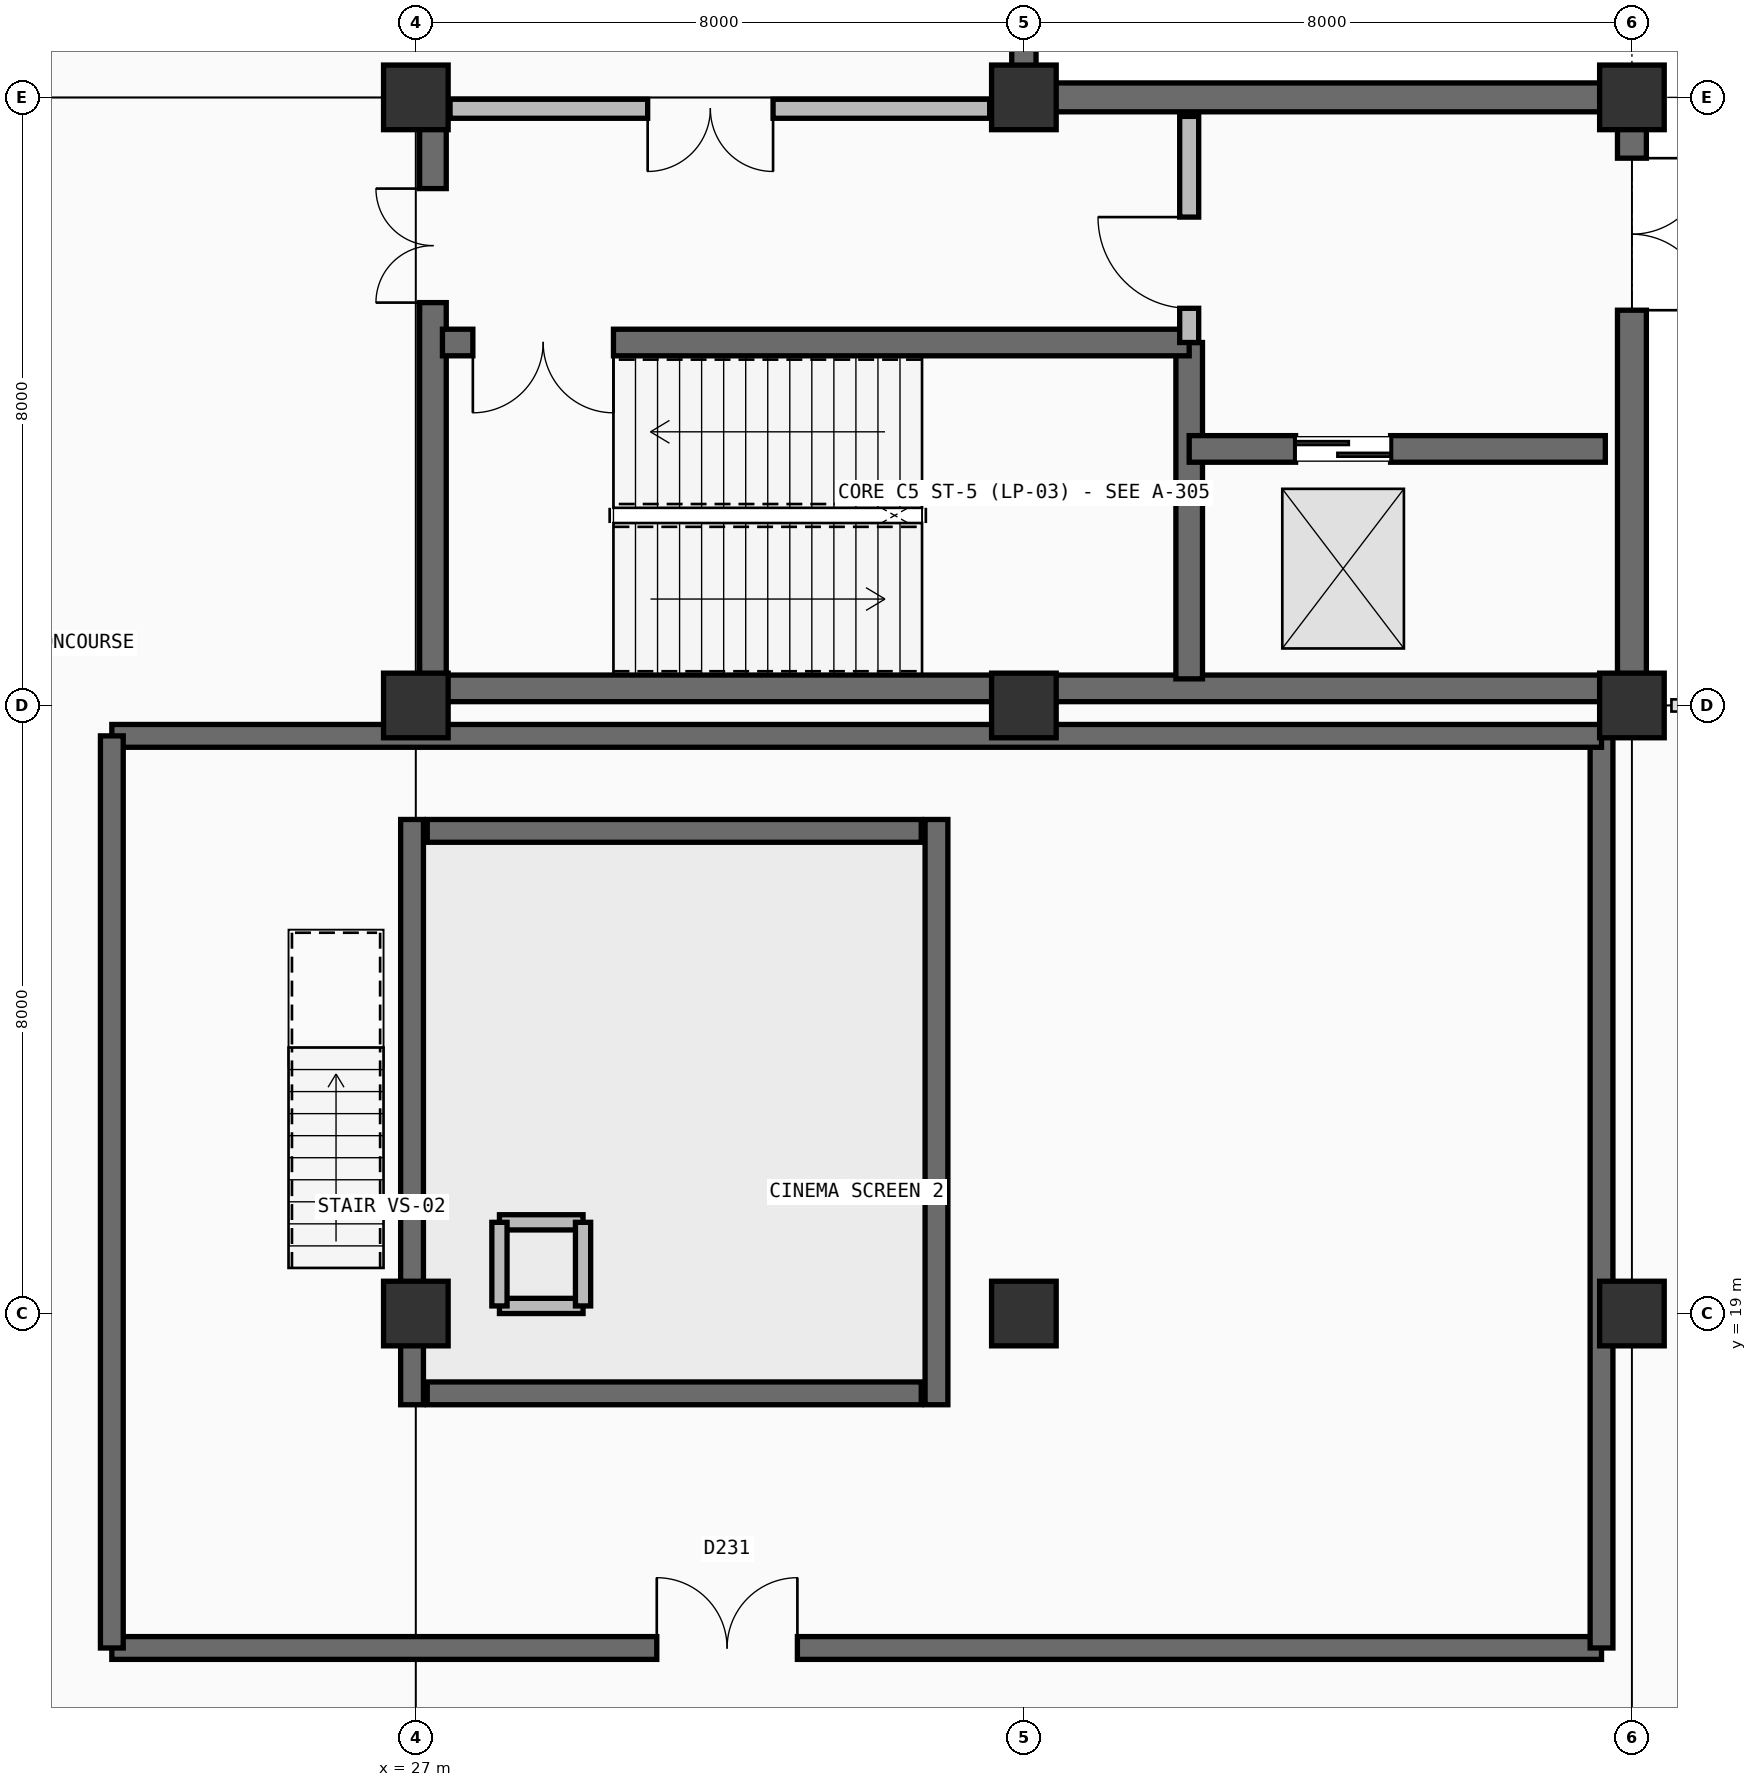
"""IFC4 building model, lengths in metres.
Left out: names, types, materials, properties, quantities, classifications, styles, units other than length and angle.
Written with IfcOpenShell. Run it as: python <this file> out.ifc"""

import sys

from ifc_helpers import new_model, si_unit, direction, frame, frame_2d, origin, origin_2d, place, context, subcontext, project, spatial, polyline, rectangle, outline, extrude, element, fill, save


model = new_model("IFC4")
c1 = context("Model", 3, precision=1e-05, world=origin(), true_north=direction((0.0, 1.0)))
c2 = subcontext(c1, "Body", "Model", "MODEL_VIEW")
j1 = project(units=[si_unit("LENGTHUNIT", "METRE"), si_unit("PLANEANGLEUNIT", "RADIAN")], contexts=[c1])
p1 = place(None, origin())
s1 = spatial("IfcSite", under=j1, at=p1, CompositionType="ELEMENT")
p2 = place(p1, origin())
s2 = spatial("IfcBuilding", under=s1, at=p2, CompositionType="ELEMENT")
p3 = place(p2, origin())
s3 = spatial("IfcBuildingStorey", under=s2, at=p3, CompositionType="ELEMENT", Elevation=0.0)
for number, where, z_axis, x_axis in (
    (1, (27.0, 19.0, 0.0), (0.0, 0.0, 1.0), (1.0, 0.0, 0.0)),
    (2, (27.0, 27.0, 0.0), (0.0, 0.0, 1.0), (1.0, 0.0, 0.0)),
    (3, (27.0, 35.0, 0.0), (0.0, 0.0, 1.0), (1.0, 0.0, 0.0)),
    (4, (35.0, 19.0, 0.0), (0.0, 0.0, 1.0), (1.0, 0.0, 0.0)),
    (5, (35.0, 27.0, 0.0), (0.0, 0.0, 1.0), (1.0, 0.0, 0.0)),
    (6, (35.0, 35.0, 0.0), (0.0, 0.0, 1.0), (1.0, 0.0, 0.0)),
    (7, (43.0, 19.0, 0.0), (0.0, 0.0, 1.0), (1.0, 0.0, 0.0)),
    (8, (43.0, 27.0, 0.0), (0.0, 0.0, 1.0), (1.0, 0.0, 0.0)),
    (9, (43.0, 35.0, 0.0), (0.0, 0.0, 1.0), (1.0, 0.0, 0.0)),
):
    element("IfcColumn", number, at=place(p3, frame(where, z_axis=z_axis, x_axis=x_axis)), inside=s3, PredefinedType="COLUMN", context=c2, shape_type="SweptSolid", body=[
        extrude(rectangle(XDim=0.85, YDim=0.85, at=origin_2d()), origin(), (0.0, 0.0, 1.0), 5.4),
    ])
for number, where, z_axis, x_axis in (
    (10, (26.95, 17.8, 0.0), (0.0, 0.0, 1.0), (0.0, 1.0, 0.0)),
    (11, (33.85, 17.8, 0.0), (0.0, 0.0, 1.0), (0.0, 1.0, 0.0)),
):
    element("IfcWall", number, at=place(p3, frame(where, z_axis=z_axis, x_axis=x_axis)), inside=s3, PredefinedType="SHEAR", context=c2, shape_type="SweptSolid", body=[
        extrude(outline(polyline([(0.0, 0.0), (7.7, 0.0), (7.7, 2.07), (0.0, 0.32), (0.0, 0.0)])), frame((0.0, 0.15, 0.0), z_axis=(0.0, -1.0, 0.0), x_axis=(1.0, 0.0, 0.0)), (0.0, 0.0, 1.0), 0.3),
    ])
p4 = place(p3, frame((27.15, 25.35, 0.0), z_axis=(0.0, 0.0, 1.0), x_axis=(1.0, 0.0, 0.0)))
e12 = element("IfcWall", 12, at=p4, inside=s3, PredefinedType="SHEAR", context=c2, shape_type="SweptSolid", body=[
    extrude(rectangle(XDim=6.5, YDim=0.3, at=frame_2d((3.25, 0.0))), origin(), (0.0, 0.0, 1.0), 2.07),
])
p5 = place(p3, frame((27.15, 17.95, 0.0), z_axis=(0.0, 0.0, 1.0), x_axis=(1.0, 0.0, 0.0)))
e13 = element("IfcWall", 13, at=p5, inside=s3, PredefinedType="SHEAR", context=c2, shape_type="SweptSolid", body=[
    extrude(rectangle(XDim=6.5, YDim=0.3, at=frame_2d((3.25, 0.0))), origin(), (0.0, 0.0, 1.0), 0.32),
])
p6 = place(p3, frame((35.0, 43.0, 0.0), z_axis=(0.0, 0.0, 1.0), x_axis=(0.0, -1.0, 0.0)))
e14 = element("IfcWall", 14, at=p6, inside=s3, PredefinedType="SOLIDWALL", context=c2, shape_type="SweptSolid", body=[
    extrude(rectangle(XDim=8.0, YDim=0.32, at=frame_2d((4.0, 0.0))), origin(), (0.0, 0.0, 1.0), 5.4),
])
p7 = place(p6, frame((5.2, 0.0, 0.0)))
e15 = element("IfcOpeningElement", 15, at=p7, cuts=e14, PredefinedType="OPENING", context=c2, shape_type="SweptSolid", body=[
    extrude(rectangle(XDim=2.0, YDim=2.6, at=frame_2d((1.0, 1.3))), frame((0.0, 0.17, 0.0), z_axis=(0.0, -1.0, 0.0), x_axis=(1.0, 0.0, 0.0)), (0.0, 0.0, 1.0), 0.34),
])
p8 = place(p3, frame((35.0, 35.0, 0.0), z_axis=(0.0, 0.0, 1.0), x_axis=(1.0, 0.0, 0.0)))
e16 = element("IfcWall", 16, at=p8, inside=s3, PredefinedType="SOLIDWALL", context=c2, shape_type="SweptSolid", body=[
    extrude(rectangle(XDim=8.0, YDim=0.38, at=frame_2d((4.0, 0.0))), origin(), (0.0, 0.0, 1.0), 5.4),
])
p9 = place(p3, frame((43.0, 35.0, 0.0), z_axis=(0.0, 0.0, 1.0), x_axis=(0.0, -1.0, 0.0)))
e17 = element("IfcWall", 17, at=p9, inside=s3, PredefinedType="SOLIDWALL", context=c2, shape_type="SweptSolid", body=[
    extrude(rectangle(XDim=8.0, YDim=0.38, at=frame_2d((4.0, 0.0))), origin(), (0.0, 0.0, 1.0), 5.4),
])
p10 = place(p9, frame((0.8, 0.0, 0.0)))
e18 = element("IfcOpeningElement", 18, at=p10, cuts=e17, PredefinedType="OPENING", context=c2, shape_type="SweptSolid", body=[
    extrude(rectangle(XDim=2.0, YDim=2.6, at=frame_2d((1.0, 1.3))), frame((0.0, 0.2, 0.0), z_axis=(0.0, -1.0, 0.0), x_axis=(1.0, 0.0, 0.0)), (0.0, 0.0, 1.0), 0.4),
])
p11 = place(p3, frame((27.2, 27.225, 0.0), z_axis=(0.0, 0.0, 1.0), x_axis=(1.0, 0.0, 0.0)))
e19 = element("IfcWall", 19, at=p11, inside=s3, PredefinedType="SHEAR", context=c2, shape_type="SweptSolid", body=[
    extrude(rectangle(XDim=15.6, YDim=0.35, at=frame_2d((7.8, 0.0))), origin(), (0.0, 0.0, 1.0), 5.1),
])
p12 = place(p3, frame((27.225, 27.2, 0.0), z_axis=(0.0, 0.0, 1.0), x_axis=(0.0, 1.0, 0.0)))
e20 = element("IfcWall", 20, at=p12, inside=s3, PredefinedType="SHEAR", context=c2, shape_type="SweptSolid", body=[
    extrude(rectangle(XDim=7.6, YDim=0.35, at=frame_2d((3.8, 0.0))), origin(), (0.0, 0.0, 1.0), 5.1),
])
p13 = place(p12, frame((5.1, 0.0, 0.0)))
e21 = element("IfcOpeningElement", 21, at=p13, cuts=e20, PredefinedType="OPENING", context=c2, shape_type="SweptSolid", body=[
    extrude(rectangle(XDim=1.5, YDim=2.2, at=frame_2d((0.75, 1.1))), frame((0.0, 0.185, 0.0), z_axis=(0.0, -1.0, 0.0), x_axis=(1.0, 0.0, 0.0)), (0.0, 0.0, 1.0), 0.37),
])
p14 = place(p3, frame((37.175, 27.35, 0.0), z_axis=(0.0, 0.0, 1.0), x_axis=(0.0, 1.0, 0.0)))
e22 = element("IfcWall", 22, at=p14, inside=s3, PredefinedType="SHEAR", context=c2, shape_type="SweptSolid", body=[
    extrude(rectangle(XDim=4.425, YDim=0.35, at=frame_2d((2.212, 0.0))), origin(), (0.0, 0.0, 1.0), 5.1),
])
p15 = place(p3, frame((27.35, 31.775, 0.0), z_axis=(0.0, 0.0, 1.0), x_axis=(1.0, 0.0, 0.0)))
e23 = element("IfcWall", 23, at=p15, inside=s3, PredefinedType="SHEAR", context=c2, shape_type="SweptSolid", body=[
    extrude(rectangle(XDim=9.825, YDim=0.35, at=frame_2d((4.913, 0.0))), origin(), (0.0, 0.0, 1.0), 5.1),
])
p16 = place(p15, frame((0.4, 0.0, 0.0)))
e24 = element("IfcOpeningElement", 24, at=p16, cuts=e23, PredefinedType="OPENING", context=c2, shape_type="SweptSolid", body=[
    extrude(rectangle(XDim=1.85, YDim=2.25, at=frame_2d((0.925, 1.125))), frame((0.0, 0.185, 0.0), z_axis=(0.0, -1.0, 0.0), x_axis=(1.0, 0.0, 0.0)), (0.0, 0.0, 1.0), 0.37),
])
p17 = place(p3, frame((37.175, 30.375, 0.0), z_axis=(0.0, 0.0, 1.0), x_axis=(1.0, 0.0, 0.0)))
e25 = element("IfcWall", 25, at=p17, inside=s3, PredefinedType="SHEAR", context=c2, shape_type="SweptSolid", body=[
    extrude(rectangle(XDim=5.475, YDim=0.35, at=frame_2d((2.737, 0.0))), origin(), (0.0, 0.0, 1.0), 5.1),
])
p18 = place(p17, frame((1.4, 0.0, 0.0)))
e26 = element("IfcOpeningElement", 26, at=p18, cuts=e25, PredefinedType="OPENING", context=c2, shape_type="SweptSolid", body=[
    extrude(rectangle(XDim=1.25, YDim=2.25, at=frame_2d((0.625, 1.125))), frame((0.0, 0.185, 0.0), z_axis=(0.0, -1.0, 0.0), x_axis=(1.0, 0.0, 0.0)), (0.0, 0.0, 1.0), 0.37),
])
p19 = place(p3, frame((37.175, 31.775, 0.0), z_axis=(0.0, 0.0, 1.0), x_axis=(0.0, 1.0, 0.0)))
e27 = element("IfcWall", 27, at=p19, inside=s3, PredefinedType="PARTITIONING", context=c2, shape_type="SweptSolid", body=[
    extrude(rectangle(XDim=2.975, YDim=0.25, at=frame_2d((1.488, 0.0))), origin(), (0.0, 0.0, 1.0), 5.1),
])
p20 = place(p19, frame((0.45, 0.0, 0.0)))
e28 = element("IfcOpeningElement", 28, at=p20, cuts=e27, PredefinedType="OPENING", context=c2, shape_type="SweptSolid", body=[
    extrude(rectangle(XDim=1.2, YDim=2.2, at=frame_2d((0.6, 1.1))), frame((0.0, 0.135, 0.0), z_axis=(0.0, -1.0, 0.0), x_axis=(1.0, 0.0, 0.0)), (0.0, 0.0, 1.0), 0.27),
])
p21 = place(p3, frame((27.45, 34.85, 0.0), z_axis=(0.0, 0.0, 1.0), x_axis=(1.0, 0.0, 0.0)))
e29 = element("IfcWall", 29, at=p21, inside=s3, PredefinedType="PARTITIONING", context=c2, shape_type="SweptSolid", body=[
    extrude(rectangle(XDim=7.1, YDim=0.25, at=frame_2d((3.55, 0.0))), origin(), (0.0, 0.0, 1.0), 4.335),
])
p22 = place(p21, frame((2.6, 0.0, 0.0)))
e30 = element("IfcOpeningElement", 30, at=p22, cuts=e29, PredefinedType="OPENING", context=c2, shape_type="SweptSolid", body=[
    extrude(rectangle(XDim=1.65, YDim=2.25, at=frame_2d((0.825, 1.125))), frame((0.0, 0.135, 0.0), z_axis=(0.0, -1.0, 0.0), x_axis=(1.0, 0.0, 0.0)), (0.0, 0.0, 1.0), 0.27),
])
p23 = place(p3, frame((23.0, 14.6, 0.0), z_axis=(0.0, 0.0, 1.0), x_axis=(1.0, 0.0, 0.0)))
e31 = element("IfcWall", 31, at=p23, inside=s3, PredefinedType="SHEAR", context=c2, shape_type="SweptSolid", body=[
    extrude(rectangle(XDim=19.6, YDim=0.3, at=frame_2d((9.8, 0.0))), origin(), (0.0, 0.0, 1.0), 5.1),
])
p24 = place(p23, frame((7.17, 0.0, 0.0)))
e32 = element("IfcOpeningElement", 32, at=p24, cuts=e31, PredefinedType="OPENING", context=c2, shape_type="SweptSolid", body=[
    extrude(rectangle(XDim=1.85, YDim=2.25, at=frame_2d((0.925, 1.125))), frame((0.0, 0.16, 0.0), z_axis=(0.0, -1.0, 0.0), x_axis=(1.0, 0.0, 0.0)), (0.0, 0.0, 1.0), 0.32),
])
p25 = place(p3, frame((42.6, 14.6, 0.0), z_axis=(0.0, 0.0, 1.0), x_axis=(0.0, 1.0, 0.0)))
e33 = element("IfcWall", 33, at=p25, inside=s3, PredefinedType="SHEAR", context=c2, shape_type="SweptSolid", body=[
    extrude(rectangle(XDim=12.0, YDim=0.3, at=frame_2d((6.0, 0.0))), origin(), (0.0, 0.0, 1.0), 5.1),
])
p26 = place(p3, frame((23.0, 26.6, 0.0), z_axis=(0.0, 0.0, 1.0), x_axis=(1.0, 0.0, 0.0)))
e34 = element("IfcWall", 34, at=p26, inside=s3, PredefinedType="SHEAR", context=c2, shape_type="SweptSolid", body=[
    extrude(rectangle(XDim=19.6, YDim=0.3, at=frame_2d((9.8, 0.0))), origin(), (0.0, 0.0, 1.0), 5.1),
])
p27 = place(p3, frame((23.0, 14.6, 0.0), z_axis=(0.0, 0.0, 1.0), x_axis=(0.0, 1.0, 0.0)))
e35 = element("IfcWall", 35, at=p27, inside=s3, PredefinedType="SHEAR", context=c2, shape_type="SweptSolid", body=[
    extrude(rectangle(XDim=12.0, YDim=0.3, at=frame_2d((6.0, 0.0))), origin(), (0.0, 0.0, 1.0), 5.1),
])
p28 = place(p3, frame((28.1, 19.1, 0.0), z_axis=(0.0, 0.0, 1.0), x_axis=(1.0, 0.0, 0.0)))
e36 = element("IfcWall", 36, at=p28, inside=s3, PredefinedType="PARTITIONING", context=c2, shape_type="SweptSolid", body=[
    extrude(rectangle(XDim=1.1, YDim=0.2, at=frame_2d((0.55, 0.0))), origin(), (0.0, 0.0, 1.0), 4.335),
])
for number, where, z_axis, x_axis in (
    (37, (28.1, 20.2, 0.0), (0.0, 0.0, 1.0), (1.0, 0.0, 0.0)),
    (38, (28.1, 19.1, 0.0), (0.0, 0.0, 1.0), (0.0, 1.0, 0.0)),
    (39, (29.2, 19.1, 0.0), (0.0, 0.0, 1.0), (0.0, 1.0, 0.0)),
):
    element("IfcWall", number, at=place(p3, frame(where, z_axis=z_axis, x_axis=x_axis)), inside=s3, PredefinedType="PARTITIONING", context=c2, shape_type="SweptSolid", body=[
        extrude(rectangle(XDim=1.1, YDim=0.2, at=frame_2d((0.55, 0.0))), origin(), (0.0, 0.0, 1.0), 5.1),
    ])
p29 = place(p10, origin())
e40 = element("IfcDoor", 40, at=p29, inside=s3, OperationType="DOUBLE_DOOR_SINGLE_SWING", PredefinedType="DOOR", context=c2, shape_type="SweptSolid", body=[
    extrude(rectangle(XDim=2.0, YDim=2.6, at=frame_2d((1.0, 1.3))), frame((0.0, 0.025, 0.0), z_axis=(0.0, -1.0, 0.0), x_axis=(1.0, 0.0, 0.0)), (0.0, 0.0, 1.0), 0.05),
])
fill(e18, e40)
p30 = place(p16, frame((1.85, 0.0, 0.0), z_axis=(0.0, 0.0, 1.0), x_axis=(-1.0, 0.0, 0.0)))
e41 = element("IfcDoor", 41, at=p30, inside=s3, OperationType="DOUBLE_DOOR_SINGLE_SWING", PredefinedType="DOOR", context=c2, shape_type="SweptSolid", body=[
    extrude(rectangle(XDim=1.85, YDim=2.25, at=frame_2d((0.925, 1.125))), frame((0.0, 0.025, 0.0), z_axis=(0.0, -1.0, 0.0), x_axis=(1.0, 0.0, 0.0)), (0.0, 0.0, 1.0), 0.05),
])
fill(e24, e41)
p31 = place(p18, origin())
e42 = element("IfcDoor", 42, at=p31, inside=s3, OperationType="DOUBLE_DOOR_SLIDING", PredefinedType="DOOR", context=c2, shape_type="SweptSolid", body=[
    extrude(rectangle(XDim=1.25, YDim=2.25, at=frame_2d((0.625, 1.125))), frame((0.0, 0.025, 0.0), z_axis=(0.0, -1.0, 0.0), x_axis=(1.0, 0.0, 0.0)), (0.0, 0.0, 1.0), 0.05),
])
fill(e26, e42)
p32 = place(p20, origin())
e43 = element("IfcDoor", 43, at=p32, inside=s3, OperationType="SINGLE_SWING_RIGHT", PredefinedType="DOOR", context=c2, shape_type="SweptSolid", body=[
    extrude(rectangle(XDim=1.2, YDim=2.2, at=frame_2d((0.6, 1.1))), frame((0.0, 0.025, 0.0), z_axis=(0.0, -1.0, 0.0), x_axis=(1.0, 0.0, 0.0)), (0.0, 0.0, 1.0), 0.05),
])
fill(e28, e43)
p33 = place(p22, frame((1.65, 0.0, 0.0), z_axis=(0.0, 0.0, 1.0), x_axis=(-1.0, 0.0, 0.0)))
e44 = element("IfcDoor", 44, at=p33, inside=s3, OperationType="DOUBLE_DOOR_SINGLE_SWING", PredefinedType="DOOR", context=c2, shape_type="SweptSolid", body=[
    extrude(rectangle(XDim=1.65, YDim=2.25, at=frame_2d((0.825, 1.125))), frame((0.0, 0.025, 0.0), z_axis=(0.0, -1.0, 0.0), x_axis=(1.0, 0.0, 0.0)), (0.0, 0.0, 1.0), 0.05),
])
fill(e30, e44)
p34 = place(p13, origin())
e45 = element("IfcDoor", 45, at=p34, inside=s3, OperationType="DOUBLE_DOOR_SINGLE_SWING", PredefinedType="DOOR", context=c2, shape_type="SweptSolid", body=[
    extrude(rectangle(XDim=1.5, YDim=2.2, at=frame_2d((0.75, 1.1))), frame((0.0, 0.025, 0.0), z_axis=(0.0, -1.0, 0.0), x_axis=(1.0, 0.0, 0.0)), (0.0, 0.0, 1.0), 0.05),
])
fill(e21, e45)
p35 = place(p24, origin())
e46 = element("IfcDoor", 46, at=p35, inside=s3, OperationType="DOUBLE_DOOR_SINGLE_SWING", PredefinedType="DOOR", context=c2, shape_type="SweptSolid", body=[
    extrude(rectangle(XDim=1.85, YDim=2.25, at=frame_2d((0.925, 1.125))), frame((0.0, 0.025, 0.0), z_axis=(0.0, -1.0, 0.0), x_axis=(1.0, 0.0, 0.0)), (0.0, 0.0, 1.0), 0.05),
])
fill(e32, e46)
save(model, sys.argv[1])
